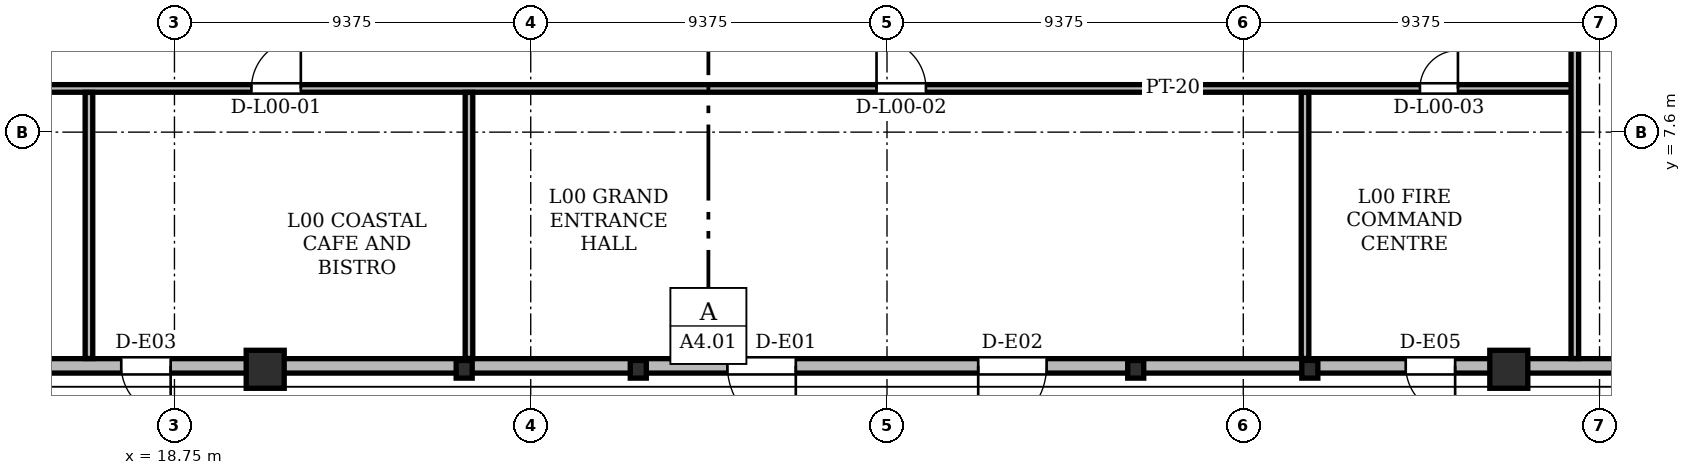
"""IFC4 building model, lengths in metres.
Left out: names, types, materials, properties, quantities, classifications, styles, units other than length and angle.
Written with IfcOpenShell. Run it as: python <this file> out.ifc"""

import sys

from ifc_helpers import new_model, si_unit, direction, frame, frame_2d, origin, origin_2d, place, context, subcontext, project, spatial, rectangle, hollow_rectangle, i_section, extrude, element, fill, save


model = new_model("IFC4")
c1 = context("Model", 3, precision=1e-05, world=origin(), true_north=direction((0.0, 1.0)))
c2 = subcontext(c1, "Body", "Model", "MODEL_VIEW")
j1 = project(units=[si_unit("LENGTHUNIT", "METRE"), si_unit("PLANEANGLEUNIT", "RADIAN")], contexts=[c1])
p1 = place(None, origin())
s1 = spatial("IfcSite", under=j1, at=p1, CompositionType="ELEMENT")
p2 = place(p1, origin())
s2 = spatial("IfcBuilding", under=s1, at=p2, CompositionType="ELEMENT")
p3 = place(p2, origin())
s3 = spatial("IfcBuildingStorey", under=s2, at=p3, CompositionType="ELEMENT", Elevation=0.0)
for number, where, z_axis, x_axis in (
    (1, (21.138, 1.36, 0.004), (0.0, 0.0, 1.0), (1.0, 0.0, 0.0)),
    (2, (53.862, 1.36, 0.004), (0.0, 0.0, 1.0), (1.0, 0.0, 0.0)),
):
    element("IfcColumn", number, at=place(p3, frame(where, z_axis=z_axis, x_axis=x_axis)), inside=s3, PredefinedType="COLUMN", context=c2, shape_type="SweptSolid", body=[
        extrude(hollow_rectangle(XDim=1.0, YDim=1.0, WallThickness=0.085, at=origin_2d()), origin(), (0.0, 0.0, 1.0), 5.391),
    ])
for number, where, z_axis, x_axis in (
    (3, (26.374, 1.36, 0.004), (0.0, 0.0, 1.0), (1.0, 0.0, 0.0)),
    (4, (30.955, 1.36, 0.004), (0.0, 0.0, 1.0), (1.0, 0.0, 0.0)),
    (5, (44.045, 1.36, 0.004), (0.0, 0.0, 1.0), (1.0, 0.0, 0.0)),
    (6, (48.626, 1.36, 0.004), (0.0, 0.0, 1.0), (1.0, 0.0, 0.0)),
):
    element("IfcColumn", number, at=place(p3, frame(where, z_axis=z_axis, x_axis=x_axis)), inside=s3, PredefinedType="COLUMN", context=c2, shape_type="SweptSolid", body=[
        extrude(i_section(OverallWidth=0.422, OverallDepth=0.465, WebThickness=0.045, FlangeThickness=0.072, at=origin_2d()), origin(), (0.0, 0.0, 1.0), 5.391),
    ])
p4 = place(p3, frame((76.072, 1.45, 0.0), z_axis=(0.0, 0.0, 1.0), x_axis=(-1.0, 0.0, 0.0)))
e7 = element("IfcWall", 7, at=p4, inside=s3, PredefinedType="SOLIDWALL", context=c2, shape_type="SweptSolid", body=[
    extrude(rectangle(XDim=77.145, YDim=0.38, at=frame_2d((38.572, 0.0))), origin(), (0.0, 0.0, 1.0), 4.183),
])
p5 = place(p4, frame((40.972, 0.0, 0.0)))
e8 = element("IfcOpeningElement", 8, at=p5, cuts=e7, PredefinedType="OPENING", context=c2, shape_type="SweptSolid", body=[
    extrude(rectangle(XDim=1.8, YDim=2.35, at=frame_2d((0.9, 1.175))), frame((0.0, 0.19, 0.0), z_axis=(0.0, -1.0, 0.0), x_axis=(1.0, 0.0, 0.0)), (0.0, 0.0, 1.0), 0.38),
])
p6 = place(p4, frame((34.372, 0.0, 0.0)))
e9 = element("IfcOpeningElement", 9, at=p6, cuts=e7, PredefinedType="OPENING", context=c2, shape_type="SweptSolid", body=[
    extrude(rectangle(XDim=1.8, YDim=2.35, at=frame_2d((0.9, 1.175))), frame((0.0, 0.19, 0.0), z_axis=(0.0, -1.0, 0.0), x_axis=(1.0, 0.0, 0.0)), (0.0, 0.0, 1.0), 0.38),
])
p7 = place(p4, frame((57.422, 0.0, 0.0)))
e10 = element("IfcOpeningElement", 10, at=p7, cuts=e7, PredefinedType="OPENING", context=c2, shape_type="SweptSolid", body=[
    extrude(rectangle(XDim=1.3, YDim=2.25, at=frame_2d((0.65, 1.125))), frame((0.0, 0.19, 0.0), z_axis=(0.0, -1.0, 0.0), x_axis=(1.0, 0.0, 0.0)), (0.0, 0.0, 1.0), 0.38),
])
p8 = place(p4, frame((23.622, 0.0, 0.0)))
e11 = element("IfcOpeningElement", 11, at=p8, cuts=e7, PredefinedType="OPENING", context=c2, shape_type="SweptSolid", body=[
    extrude(rectangle(XDim=1.3, YDim=2.25, at=frame_2d((0.65, 1.125))), frame((0.0, 0.19, 0.0), z_axis=(0.0, -1.0, 0.0), x_axis=(1.0, 0.0, 0.0)), (0.0, 0.0, 1.0), 0.38),
])
p9 = place(p3, frame((13.99, 8.75, 0.0), z_axis=(0.0, 0.0, 1.0), x_axis=(1.0, 0.0, 0.0)))
e12 = element("IfcWall", 12, at=p9, inside=s3, PredefinedType="PARTITIONING", context=c2, shape_type="SweptSolid", body=[
    extrude(rectangle(XDim=41.61, YDim=0.2, at=frame_2d((20.805, 0.0))), origin(), (0.0, 0.0, 1.0), 4.183),
])
p10 = place(p9, frame((6.785, 0.0, 0.0)))
e13 = element("IfcOpeningElement", 13, at=p10, cuts=e12, PredefinedType="OPENING", context=c2, shape_type="SweptSolid", body=[
    extrude(rectangle(XDim=1.3, YDim=2.2, at=frame_2d((0.65, 1.1))), frame((0.0, 0.1, 0.0), z_axis=(0.0, -1.0, 0.0), x_axis=(1.0, 0.0, 0.0)), (0.0, 0.0, 1.0), 0.2),
])
p11 = place(p9, frame((23.235, 0.0, 0.0)))
e14 = element("IfcOpeningElement", 14, at=p11, cuts=e12, PredefinedType="OPENING", context=c2, shape_type="SweptSolid", body=[
    extrude(rectangle(XDim=1.3, YDim=2.2, at=frame_2d((0.65, 1.1))), frame((0.0, 0.1, 0.0), z_axis=(0.0, -1.0, 0.0), x_axis=(1.0, 0.0, 0.0)), (0.0, 0.0, 1.0), 0.2),
])
p12 = place(p9, frame((37.534, 0.0, 0.0)))
e15 = element("IfcOpeningElement", 15, at=p12, cuts=e12, PredefinedType="OPENING", context=c2, shape_type="SweptSolid", body=[
    extrude(rectangle(XDim=1.0, YDim=2.18, at=frame_2d((0.5, 1.09))), frame((0.0, 0.1, 0.0), z_axis=(0.0, -1.0, 0.0), x_axis=(1.0, 0.0, 0.0)), (0.0, 0.0, 1.0), 0.2),
])
p13 = place(p3, frame((16.5, 1.644, 0.0), z_axis=(0.0, 0.0, 1.0), x_axis=(0.0, 1.0, 0.0)))
e16 = element("IfcWall", 16, at=p13, inside=s3, PredefinedType="PARTITIONING", context=c2, shape_type="SweptSolid", body=[
    extrude(rectangle(XDim=7.002, YDim=0.2, at=frame_2d((3.501, 0.0))), origin(), (0.0, 0.0, 1.0), 5.12),
])
for number, where, z_axis, x_axis in (
    (17, (26.5, 1.644, 0.0), (0.0, 0.0, 1.0), (0.0, 1.0, 0.0)),
    (18, (48.5, 1.644, 0.0), (0.0, 0.0, 1.0), (0.0, 1.0, 0.0)),
):
    element("IfcWall", number, at=place(p3, frame(where, z_axis=z_axis, x_axis=x_axis)), inside=s3, PredefinedType="PARTITIONING", context=c2, shape_type="SweptSolid", body=[
        extrude(rectangle(XDim=7.002, YDim=0.2, at=frame_2d((3.501, 0.0))), origin(), (0.0, 0.0, 1.0), 4.183),
    ])
p14 = place(p3, frame((55.6, 1.644, 0.0), z_axis=(0.0, 0.0, 1.0), x_axis=(0.0, 1.0, 0.0)))
e19 = element("IfcWall", 19, at=p14, inside=s3, PredefinedType="PARTITIONING", context=c2, shape_type="SweptSolid", body=[
    extrude(rectangle(XDim=19.352, YDim=0.2, at=frame_2d((9.676, 0.0))), origin(), (0.0, 0.0, 1.0), 4.254),
])
p15 = place(p5, origin())
e20 = element("IfcDoor", 20, at=p15, inside=s3, OperationType="SINGLE_SWING_LEFT", PredefinedType="DOOR", context=c2, shape_type="SweptSolid", body=[
    extrude(rectangle(XDim=1.8, YDim=2.35, at=frame_2d((0.9, 1.175))), frame((0.0, 0.025, 0.0), z_axis=(0.0, -1.0, 0.0), x_axis=(1.0, 0.0, 0.0)), (0.0, 0.0, 1.0), 0.05),
])
fill(e8, e20)
p16 = place(p6, origin())
e21 = element("IfcDoor", 21, at=p16, inside=s3, OperationType="SINGLE_SWING_RIGHT", PredefinedType="DOOR", context=c2, shape_type="SweptSolid", body=[
    extrude(rectangle(XDim=1.8, YDim=2.35, at=frame_2d((0.9, 1.175))), frame((0.0, 0.025, 0.0), z_axis=(0.0, -1.0, 0.0), x_axis=(1.0, 0.0, 0.0)), (0.0, 0.0, 1.0), 0.05),
])
fill(e9, e21)
p17 = place(p7, origin())
e22 = element("IfcDoor", 22, at=p17, inside=s3, OperationType="SINGLE_SWING_LEFT", PredefinedType="DOOR", context=c2, shape_type="SweptSolid", body=[
    extrude(rectangle(XDim=1.3, YDim=2.25, at=frame_2d((0.65, 1.125))), frame((0.0, 0.025, 0.0), z_axis=(0.0, -1.0, 0.0), x_axis=(1.0, 0.0, 0.0)), (0.0, 0.0, 1.0), 0.05),
])
fill(e10, e22)
p18 = place(p8, origin())
e23 = element("IfcDoor", 23, at=p18, inside=s3, OperationType="SINGLE_SWING_LEFT", PredefinedType="DOOR", context=c2, shape_type="SweptSolid", body=[
    extrude(rectangle(XDim=1.3, YDim=2.25, at=frame_2d((0.65, 1.125))), frame((0.0, 0.025, 0.0), z_axis=(0.0, -1.0, 0.0), x_axis=(1.0, 0.0, 0.0)), (0.0, 0.0, 1.0), 0.05),
])
fill(e11, e23)
p19 = place(p10, origin())
e24 = element("IfcDoor", 24, at=p19, inside=s3, OperationType="SINGLE_SWING_RIGHT", PredefinedType="DOOR", context=c2, shape_type="SweptSolid", body=[
    extrude(rectangle(XDim=1.3, YDim=2.2, at=frame_2d((0.65, 1.1))), frame((0.0, 0.025, 0.0), z_axis=(0.0, -1.0, 0.0), x_axis=(1.0, 0.0, 0.0)), (0.0, 0.0, 1.0), 0.05),
])
fill(e13, e24)
p20 = place(p11, origin())
e25 = element("IfcDoor", 25, at=p20, inside=s3, OperationType="SINGLE_SWING_LEFT", PredefinedType="DOOR", context=c2, shape_type="SweptSolid", body=[
    extrude(rectangle(XDim=1.3, YDim=2.2, at=frame_2d((0.65, 1.1))), frame((0.0, 0.025, 0.0), z_axis=(0.0, -1.0, 0.0), x_axis=(1.0, 0.0, 0.0)), (0.0, 0.0, 1.0), 0.05),
])
fill(e14, e25)
p21 = place(p12, origin())
e26 = element("IfcDoor", 26, at=p21, inside=s3, OperationType="SINGLE_SWING_RIGHT", PredefinedType="DOOR", context=c2, shape_type="SweptSolid", body=[
    extrude(rectangle(XDim=1.0, YDim=2.18, at=frame_2d((0.5, 1.09))), frame((0.0, 0.025, 0.0), z_axis=(0.0, -1.0, 0.0), x_axis=(1.0, 0.0, 0.0)), (0.0, 0.0, 1.0), 0.05),
])
fill(e15, e26)
save(model, sys.argv[1])
